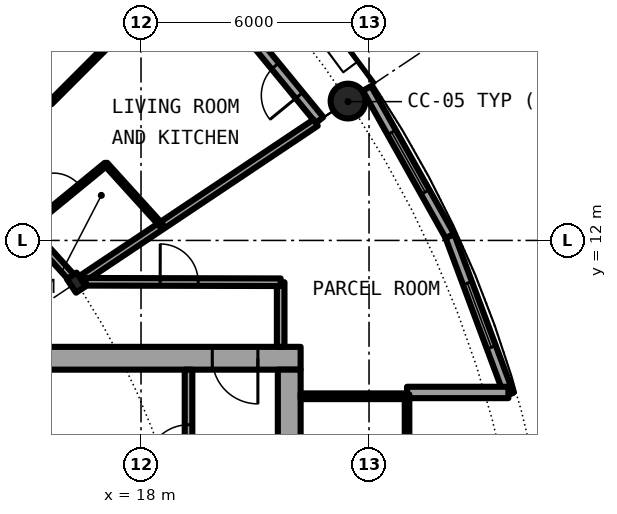
"""IFC4 building model, lengths in metres.
Left out: names, types, materials, properties, quantities, classifications, styles, units other than length and angle.
Written with IfcOpenShell. Run it as: python <this file> out.ifc"""

import sys

from ifc_helpers import new_model, si_unit, direction, frame, frame_2d, origin, origin_2d, place, context, subcontext, project, spatial, rectangle, hollow_circle, i_section, extrude, element, fill, save


model = new_model("IFC4")
c1 = context("Model", 3, precision=1e-05, world=origin(), true_north=direction((0.0, 1.0)))
c2 = subcontext(c1, "Body", "Model", "MODEL_VIEW")
j1 = project(units=[si_unit("LENGTHUNIT", "METRE"), si_unit("PLANEANGLEUNIT", "RADIAN")], contexts=[c1])
p1 = place(None, origin())
s1 = spatial("IfcSite", under=j1, at=p1, CompositionType="ELEMENT")
p2 = place(p1, origin())
s2 = spatial("IfcBuilding", under=s1, at=p2, CompositionType="ELEMENT")
p3 = place(p2, frame((0.0, 0.0, 120.8)))
s3 = spatial("IfcBuildingStorey", under=s2, at=p3, CompositionType="ELEMENT", Elevation=120.8)
p4 = place(p3, frame((23.448, 15.667, 0.0), z_axis=(0.0, 0.0, 1.0), x_axis=(1.0, 0.0, 0.0)))
e1 = element("IfcColumn", 1, at=p4, inside=s3, PredefinedType="COLUMN", context=c2, shape_type="SweptSolid", body=[
    extrude(hollow_circle(Radius=0.457, WallThickness=0.04, at=origin_2d()), origin(), (0.0, 0.0, 1.0), 3.05),
])
p5 = place(p3, frame((16.297, 10.889, 0.0), z_axis=(0.0, 0.0, 1.0), x_axis=(0.831469612303, 0.55557023302, 0.0)))
e2 = element("IfcColumn", 2, at=p5, inside=s3, PredefinedType="COLUMN", context=c2, shape_type="SweptSolid", body=[
    extrude(i_section(OverallWidth=0.307, OverallDepth=0.432, WebThickness=0.021, FlangeThickness=0.04, FilletRadius=0.027, at=origin_2d()), origin(), (0.0, 0.0, 1.0), 3.05),
])
p6 = place(p3, frame((22.699, 15.167, 0.0), z_axis=(0.0, 0.0, 1.0), x_axis=(-0.634382322723, 0.773019449054, 0.0)))
e3 = element("IfcWall", 3, at=p6, inside=s3, PredefinedType="SOLIDWALL", context=c2, shape_type="SweptSolid", body=[
    extrude(rectangle(XDim=5.352, YDim=0.25, at=frame_2d((2.676, 0.0))), origin(), (0.0, 0.0, 1.0), 2.7),
])
p7 = place(p6, frame((0.841, 0.0, 0.0)))
e4 = element("IfcOpeningElement", 4, at=p7, cuts=e3, PredefinedType="OPENING", context=c2, shape_type="SweptSolid", body=[
    extrude(rectangle(XDim=1.0, YDim=2.2, at=frame_2d((0.5, 1.1))), frame((0.0, 0.135, 0.0), z_axis=(0.0, -1.0, 0.0), x_axis=(1.0, 0.0, 0.0)), (0.0, 0.0, 1.0), 0.27),
])
p8 = place(p6, frame((3.111, 0.0, 0.3)))
e5 = element("IfcOpeningElement", 5, at=p8, cuts=e3, PredefinedType="OPENING", context=c2, shape_type="SweptSolid", body=[
    extrude(rectangle(XDim=1.8, YDim=2.1, at=frame_2d((0.9, 1.05))), frame((0.0, 0.135, 0.0), z_axis=(0.0, -1.0, 0.0), x_axis=(1.0, 0.0, 0.0)), (0.0, 0.0, 1.0), 0.27),
])
p9 = place(p3, frame((27.682, 7.945, 0.0), z_axis=(0.0, 0.0, 1.0), x_axis=(-0.349247811493, 0.937030397675, 0.0)))
e6 = element("IfcWall", 6, at=p9, inside=s3, PredefinedType="SOLIDWALL", context=c2, shape_type="SweptSolid", body=[
    extrude(rectangle(XDim=4.452, YDim=0.25, at=frame_2d((2.226, 0.0))), origin(), (0.0, 0.0, 1.0), 2.7),
])
p10 = place(p9, frame((1.327, 0.0, 0.3)))
e7 = element("IfcOpeningElement", 7, at=p10, cuts=e6, PredefinedType="OPENING", context=c2, shape_type="SweptSolid", body=[
    extrude(rectangle(XDim=1.8, YDim=2.1, at=frame_2d((0.9, 1.05))), frame((0.0, 0.135, 0.0), z_axis=(0.0, -1.0, 0.0), x_axis=(1.0, 0.0, 0.0)), (0.0, 0.0, 1.0), 0.27),
])
p11 = place(p3, frame((26.127, 12.117, 0.0), z_axis=(0.0, 0.0, 1.0), x_axis=(-0.489696356642, 0.871893042919, 0.0)))
e8 = element("IfcWall", 8, at=p11, inside=s3, PredefinedType="SOLIDWALL", context=c2, shape_type="SweptSolid", body=[
    extrude(rectangle(XDim=4.454, YDim=0.25, at=frame_2d((2.227, 0.0))), origin(), (0.0, 0.0, 1.0), 2.7),
])
p12 = place(p11, frame((1.327, 0.0, 0.3)))
e9 = element("IfcOpeningElement", 9, at=p12, cuts=e8, PredefinedType="OPENING", context=c2, shape_type="SweptSolid", body=[
    extrude(rectangle(XDim=1.8, YDim=2.1, at=frame_2d((0.9, 1.05))), frame((0.0, 0.135, 0.0), z_axis=(0.0, -1.0, 0.0), x_axis=(1.0, 0.0, 0.0)), (0.0, 0.0, 1.0), 0.27),
])
p13 = place(p3, frame((25.0, 8.0, 0.0), z_axis=(0.0, 0.0, 1.0), x_axis=(1.0, 0.0, 0.0)))
e10 = element("IfcWall", 10, at=p13, inside=s3, PredefinedType="SOLIDWALL", context=c2, shape_type="SweptSolid", body=[
    extrude(rectangle(XDim=2.667, YDim=0.3, at=frame_2d((1.333, 0.0))), origin(), (0.0, 0.0, 1.0), 2.7),
])
p14 = place(p3, frame((22.2, 8.9, 0.0), z_axis=(0.0, 0.0, 1.0), x_axis=(-1.0, 0.0, 0.0)))
e11 = element("IfcWall", 11, at=p14, inside=s3, PredefinedType="SHEAR", context=c2, shape_type="SweptSolid", body=[
    extrude(rectangle(XDim=13.8, YDim=0.6, at=frame_2d((6.9, 0.0))), origin(), (0.0, 0.0, 1.0), 3.05),
])
p15 = place(p14, frame((1.125, 0.0, 0.0)))
e12 = element("IfcOpeningElement", 12, at=p15, cuts=e11, PredefinedType="OPENING", context=c2, shape_type="SweptSolid", body=[
    extrude(rectangle(XDim=1.2, YDim=2.3, at=frame_2d((0.6, 1.15))), frame((0.0, 0.31, 0.0), z_axis=(0.0, -1.0, 0.0), x_axis=(1.0, 0.0, 0.0)), (0.0, 0.0, 1.0), 0.62),
])
p16 = place(p3, frame((21.9, 8.6, 0.0), z_axis=(0.0, 0.0, 1.0), x_axis=(0.0, -1.0, 0.0)))
e13 = element("IfcWall", 13, at=p16, inside=s3, PredefinedType="SHEAR", context=c2, shape_type="SweptSolid", body=[
    extrude(rectangle(XDim=17.2, YDim=0.6, at=frame_2d((8.6, 0.0))), origin(), (0.0, 0.0, 1.0), 3.05),
])
p17 = place(p16, frame((7.7, 0.0, 0.0)))
e14 = element("IfcOpeningElement", 14, at=p17, cuts=e13, PredefinedType="OPENING", context=c2, shape_type="SweptSolid", body=[
    extrude(rectangle(XDim=1.8, YDim=2.3, at=frame_2d((0.9, 1.15))), frame((0.0, 0.31, 0.0), z_axis=(0.0, -1.0, 0.0), x_axis=(1.0, 0.0, 0.0)), (0.0, 0.0, 1.0), 0.62),
])
p18 = place(p3, frame((19.25, 1.575, 0.0), z_axis=(0.0, 0.0, 1.0), x_axis=(0.0, 1.0, 0.0)))
e15 = element("IfcWall", 15, at=p18, inside=s3, PredefinedType="SOLIDWALL", context=c2, shape_type="SweptSolid", body=[
    extrude(rectangle(XDim=7.025, YDim=0.2, at=frame_2d((3.513, 0.0))), origin(), (0.0, 0.0, 1.0), 2.7),
])
p19 = place(p18, frame((4.475, 0.0, 0.0)))
e16 = element("IfcOpeningElement", 16, at=p19, cuts=e15, PredefinedType="OPENING", context=c2, shape_type="SweptSolid", body=[
    extrude(rectangle(XDim=1.1, YDim=2.3, at=frame_2d((0.55, 1.15))), frame((0.0, 0.11, 0.0), z_axis=(0.0, -1.0, 0.0), x_axis=(1.0, 0.0, 0.0)), (0.0, 0.0, 1.0), 0.22),
])
p20 = place(p3, frame((22.2, 7.9, 0.0), z_axis=(0.0, 0.0, 1.0), x_axis=(1.0, 0.0, 0.0)))
e17 = element("IfcWall", 17, at=p20, inside=s3, PredefinedType="PARTITIONING", context=c2, shape_type="SweptSolid", body=[
    extrude(rectangle(XDim=2.74, YDim=0.15, at=frame_2d((1.37, 0.0))), origin(), (0.0, 0.0, 1.0), 2.7),
])
p21 = place(p3, frame((25.0, -7.95, 0.0), z_axis=(0.0, 0.0, 1.0), x_axis=(0.0, 1.0, 0.0)))
e18 = element("IfcWall", 18, at=p21, inside=s3, PredefinedType="PARTITIONING", context=c2, shape_type="SweptSolid", body=[
    extrude(rectangle(XDim=15.9, YDim=0.12, at=frame_2d((7.95, 0.0))), origin(), (0.0, 0.0, 1.0), 2.7),
])
p22 = place(p21, frame((0.95, 0.0, 0.1)))
e19 = element("IfcOpeningElement", 19, at=p22, cuts=e18, PredefinedType="OPENING", context=c2, shape_type="SweptSolid", body=[
    extrude(rectangle(XDim=14.0, YDim=2.35, at=frame_2d((7.0, 1.175))), frame((0.0, 0.07, 0.0), z_axis=(0.0, -1.0, 0.0), x_axis=(1.0, 0.0, 0.0)), (0.0, 0.0, 1.0), 0.14),
])
p23 = place(p3, frame((21.675, 9.2, 0.0), z_axis=(0.0, 0.0, 1.0), x_axis=(0.0, 1.0, 0.0)))
e20 = element("IfcWall", 20, at=p23, inside=s3, PredefinedType="PARTITIONING", context=c2, shape_type="SweptSolid", body=[
    extrude(rectangle(XDim=1.7, YDim=0.2, at=frame_2d((0.85, 0.0))), origin(), (0.0, 0.0, 1.0), 2.7),
])
p24 = place(p3, frame((12.436, 15.149, 0.0), z_axis=(0.0, 0.0, 1.0), x_axis=(0.63447412651, 0.772944100689, 0.0)))
e21 = element("IfcWall", 21, at=p24, inside=s3, PredefinedType="PARTITIONING", context=c2, shape_type="SweptSolid", body=[
    extrude(rectangle(XDim=7.576, YDim=0.2, at=frame_2d((3.788, 0.0))), origin(), (0.0, 0.0, 1.0), 2.7),
])
p25 = place(p3, frame((15.01, 12.309, 0.0), z_axis=(0.0, 0.0, 1.0), x_axis=(0.773240932873, 0.634112339992, 0.0)))
e22 = element("IfcWall", 22, at=p25, inside=s3, PredefinedType="PARTITIONING", context=c2, shape_type="SweptSolid", body=[
    extrude(rectangle(XDim=2.674, YDim=0.1, at=frame_2d((1.337, 0.0))), origin(), (0.0, 0.0, 1.0), 2.7),
])
p26 = place(p25, frame((0.887, 0.0, 0.0)))
e23 = element("IfcOpeningElement", 23, at=p26, cuts=e22, PredefinedType="OPENING", context=c2, shape_type="SweptSolid", body=[
    extrude(rectangle(XDim=0.9, YDim=2.3, at=frame_2d((0.45, 1.15))), frame((0.0, 0.06, 0.0), z_axis=(0.0, -1.0, 0.0), x_axis=(1.0, 0.0, 0.0)), (0.0, 0.0, 1.0), 0.12),
])
p27 = place(p3, frame((15.613, 15.621, 0.0), z_axis=(0.0, 0.0, 1.0), x_axis=(0.706914880313, 0.707298629994, 0.0)))
e24 = element("IfcWall", 24, at=p27, inside=s3, PredefinedType="PARTITIONING", context=c2, shape_type="SweptSolid", body=[
    extrude(rectangle(XDim=5.09, YDim=0.1, at=frame_2d((2.545, 0.0))), origin(), (0.0, 0.0, 1.0), 2.7),
])
p28 = place(p27, frame((2.095, 0.0, 0.0)))
e25 = element("IfcOpeningElement", 25, at=p28, cuts=e24, PredefinedType="OPENING", context=c2, shape_type="SweptSolid", body=[
    extrude(rectangle(XDim=0.9, YDim=2.3, at=frame_2d((0.45, 1.15))), frame((0.0, 0.06, 0.0), z_axis=(0.0, -1.0, 0.0), x_axis=(1.0, 0.0, 0.0)), (0.0, 0.0, 1.0), 0.12),
])
p29 = place(p3, frame((16.477, 11.009, 0.0), z_axis=(0.0, 0.0, 1.0), x_axis=(0.831406593008, 0.555664536482, 0.0)))
e26 = element("IfcWall", 26, at=p29, inside=s3, PredefinedType="PARTITIONING", context=c2, shape_type="SweptSolid", body=[
    extrude(rectangle(XDim=7.358, YDim=0.2, at=frame_2d((3.679, 0.0))), origin(), (0.0, 0.0, 1.0), 2.7),
])
p30 = place(p3, frame((16.541, 10.912, 0.0), z_axis=(0.0, 0.0, 1.0), x_axis=(0.999997173357, -0.002377662213, 0.0)))
e27 = element("IfcWall", 27, at=p30, inside=s3, PredefinedType="PARTITIONING", context=c2, shape_type="SweptSolid", body=[
    extrude(rectangle(XDim=5.134, YDim=0.2, at=frame_2d((2.567, 0.0))), origin(), (0.0, 0.0, 1.0), 2.7),
])
p31 = place(p30, frame((1.963, 0.0, 0.0)))
e28 = element("IfcOpeningElement", 28, at=p31, cuts=e27, PredefinedType="OPENING", context=c2, shape_type="SweptSolid", body=[
    extrude(rectangle(XDim=1.0, YDim=2.3, at=frame_2d((0.5, 1.15))), frame((0.0, 0.11, 0.0), z_axis=(0.0, -1.0, 0.0), x_axis=(1.0, 0.0, 0.0)), (0.0, 0.0, 1.0), 0.22),
])
p32 = place(p3, frame((12.434, 15.151, 0.0), z_axis=(0.0, 0.0, 1.0), x_axis=(0.671481997275, -0.741020868354, 0.0)))
e29 = element("IfcWall", 29, at=p32, inside=s3, PredefinedType="PARTITIONING", context=c2, shape_type="SweptSolid", body=[
    extrude(rectangle(XDim=5.596, YDim=0.2, at=frame_2d((2.798, 0.0))), origin(), (0.0, 0.0, 1.0), 2.39),
])
p33 = place(p32, frame((1.417, 0.0, 0.0)))
e30 = element("IfcOpeningElement", 30, at=p33, cuts=e29, PredefinedType="OPENING", context=c2, shape_type="SweptSolid", body=[
    extrude(rectangle(XDim=1.0, YDim=2.3, at=frame_2d((0.5, 1.15))), frame((0.0, 0.11, 0.0), z_axis=(0.0, -1.0, 0.0), x_axis=(1.0, 0.0, 0.0)), (0.0, 0.0, 1.0), 0.22),
])
p34 = place(p3, frame((17.072, 14.011, 0.0), z_axis=(0.0, 0.0, 1.0), x_axis=(0.67169789574, -0.740825172937, 0.0)))
e31 = element("IfcWall", 31, at=p34, inside=s3, PredefinedType="PARTITIONING", context=c2, shape_type="SweptSolid", body=[
    extrude(rectangle(XDim=2.183, YDim=0.1, at=frame_2d((1.091, 0.0))), origin(), (0.0, 0.0, 1.0), 2.7),
])
p35 = place(p7, origin())
e32 = element("IfcDoor", 32, at=p35, inside=s3, OperationType="SINGLE_SWING_LEFT", PredefinedType="DOOR", context=c2, shape_type="SweptSolid", body=[
    extrude(rectangle(XDim=1.0, YDim=2.2, at=frame_2d((0.5, 1.1))), frame((0.0, 0.025, 0.0), z_axis=(0.0, -1.0, 0.0), x_axis=(1.0, 0.0, 0.0)), (0.0, 0.0, 1.0), 0.05),
])
fill(e4, e32)
p36 = place(p10, origin())
e33 = element("IfcWindow", 33, at=p36, inside=s3, PartitioningType="SINGLE_PANEL", PredefinedType="WINDOW", context=c2, shape_type="SweptSolid", body=[
    extrude(rectangle(XDim=1.8, YDim=2.1, at=frame_2d((0.9, 1.05))), frame((0.0, 0.03, 0.0), z_axis=(0.0, -1.0, 0.0), x_axis=(1.0, 0.0, 0.0)), (0.0, 0.0, 1.0), 0.06),
])
fill(e7, e33)
p37 = place(p12, origin())
e34 = element("IfcWindow", 34, at=p37, inside=s3, PartitioningType="SINGLE_PANEL", PredefinedType="WINDOW", context=c2, shape_type="SweptSolid", body=[
    extrude(rectangle(XDim=1.8, YDim=2.1, at=frame_2d((0.9, 1.05))), frame((0.0, 0.03, 0.0), z_axis=(0.0, -1.0, 0.0), x_axis=(1.0, 0.0, 0.0)), (0.0, 0.0, 1.0), 0.06),
])
fill(e9, e34)
p38 = place(p19, origin())
e35 = element("IfcDoor", 35, at=p38, inside=s3, OperationType="SINGLE_SWING_LEFT", PredefinedType="DOOR", context=c2, shape_type="SweptSolid", body=[
    extrude(rectangle(XDim=1.1, YDim=2.3, at=frame_2d((0.55, 1.15))), frame((0.0, 0.025, 0.0), z_axis=(0.0, -1.0, 0.0), x_axis=(1.0, 0.0, 0.0)), (0.0, 0.0, 1.0), 0.05),
])
fill(e16, e35)
p39 = place(p15, origin())
e36 = element("IfcDoor", 36, at=p39, inside=s3, OperationType="SINGLE_SWING_RIGHT", PredefinedType="DOOR", context=c2, shape_type="SweptSolid", body=[
    extrude(rectangle(XDim=1.2, YDim=2.3, at=frame_2d((0.6, 1.15))), frame((0.0, 0.025, 0.0), z_axis=(0.0, -1.0, 0.0), x_axis=(1.0, 0.0, 0.0)), (0.0, 0.0, 1.0), 0.05),
])
fill(e12, e36)
p40 = place(p22, origin())
e37 = element("IfcWindow", 37, at=p40, inside=s3, PartitioningType="SINGLE_PANEL", PredefinedType="WINDOW", context=c2, shape_type="SweptSolid", body=[
    extrude(rectangle(XDim=14.0, YDim=2.35, at=frame_2d((7.0, 1.175))), frame((0.0, 0.03, 0.0), z_axis=(0.0, -1.0, 0.0), x_axis=(1.0, 0.0, 0.0)), (0.0, 0.0, 1.0), 0.06),
])
fill(e19, e37)
p41 = place(p26, origin())
e38 = element("IfcDoor", 38, at=p41, inside=s3, OperationType="SINGLE_SWING_LEFT", PredefinedType="DOOR", context=c2, shape_type="SweptSolid", body=[
    extrude(rectangle(XDim=0.9, YDim=2.3, at=frame_2d((0.45, 1.15))), frame((0.0, 0.025, 0.0), z_axis=(0.0, -1.0, 0.0), x_axis=(1.0, 0.0, 0.0)), (0.0, 0.0, 1.0), 0.05),
])
fill(e23, e38)
p42 = place(p31, origin())
e39 = element("IfcDoor", 39, at=p42, inside=s3, OperationType="SINGLE_SWING_LEFT", PredefinedType="DOOR", context=c2, shape_type="SweptSolid", body=[
    extrude(rectangle(XDim=1.0, YDim=2.3, at=frame_2d((0.5, 1.15))), frame((0.0, 0.025, 0.0), z_axis=(0.0, -1.0, 0.0), x_axis=(1.0, 0.0, 0.0)), (0.0, 0.0, 1.0), 0.05),
])
fill(e28, e39)
save(model, sys.argv[1])
